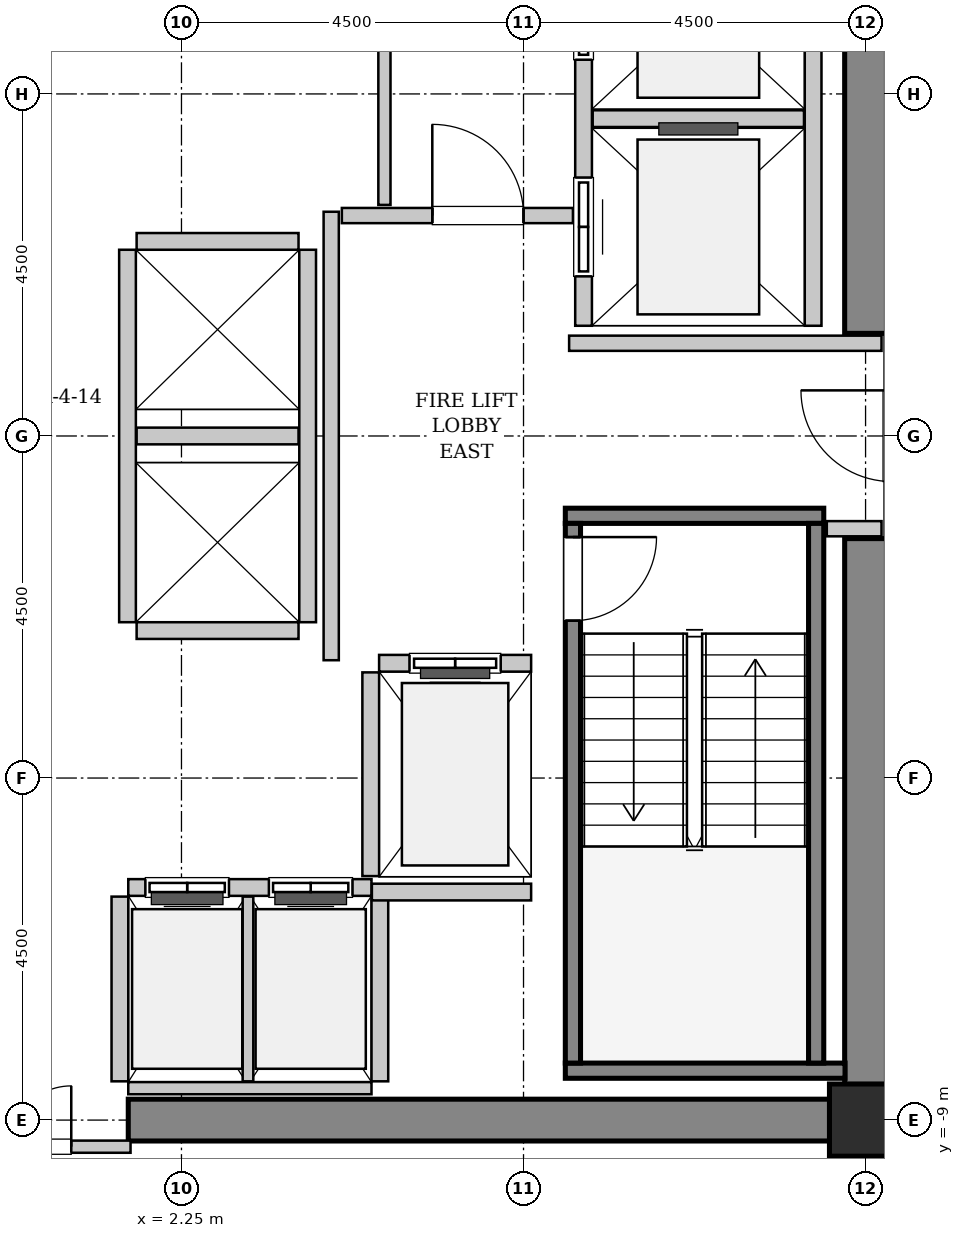
"""IFC4 building model, lengths in metres.
Left out: names, types, materials, properties, quantities, classifications, styles, units other than length and angle.
Written with IfcOpenShell. Run it as: python <this file> out.ifc"""

import sys

from ifc_helpers import new_model, si_unit, direction, frame, frame_2d, origin, origin_2d, place, context, subcontext, project, spatial, rectangle, hollow_rectangle, extrude, source, transform, mapped, element, fill, save


model = new_model("IFC4")
c1 = context("Model", 3, precision=1e-05, world=origin(), true_north=direction((0.0, 1.0)))
c2 = subcontext(c1, "Body", "Model", "MODEL_VIEW")
j1 = project(units=[si_unit("LENGTHUNIT", "METRE"), si_unit("PLANEANGLEUNIT", "RADIAN")], contexts=[c1])
p1 = place(None, origin())
s1 = spatial("IfcSite", under=j1, at=p1, CompositionType="ELEMENT")
p2 = place(p1, origin())
s2 = spatial("IfcBuilding", under=s1, at=p2, CompositionType="ELEMENT")
p3 = place(p2, frame((0.0, 0.0, 148.8)))
s3 = spatial("IfcBuildingStorey", under=s2, at=p3, CompositionType="ELEMENT", Elevation=148.8)
m1 = source(origin(), c2, "Body", "SweptSolid", [
    extrude(rectangle(XDim=9.975, YDim=0.55, at=frame_2d((4.987, 0.0))), origin(), (0.0, 0.0, 1.0), 3.8),
])
p4 = place(p3, frame((1.55, -9.0, 0.0), z_axis=(0.0, 0.0, 1.0), x_axis=(1.0, 0.0, 0.0)))
e1 = element("IfcWall", 1, at=p4, inside=s3, PredefinedType="SHEAR", context=c2, shape_type="MappedRepresentation", body=[
    mapped(m1, transform((0.0, 0.0, 0.0), x_axis=(1.0, 0.0, 0.0), y_axis=(0.0, 1.0, 0.0), z_axis=(0.0, 0.0, 1.0), scale=1.0)),
])
m2 = source(origin(), c2, "Body", "SweptSolid", [
    extrude(rectangle(XDim=7.375, YDim=0.55, at=frame_2d((3.688, 0.0))), origin(), (0.0, 0.0, 1.0), 3.8),
])
for number, where, z_axis, x_axis in (
    (2, (11.25, -8.725, 0.0), (0.0, 0.0, 1.0), (0.0, 1.0, 0.0)),
    (3, (11.25, 1.35, 0.0), (0.0, 0.0, 1.0), (0.0, 1.0, 0.0)),
):
    element("IfcWall", number, at=place(p3, frame(where, z_axis=z_axis, x_axis=x_axis)), inside=s3, PredefinedType="SHEAR", context=c2, shape_type="MappedRepresentation", body=[
        mapped(m2, transform((0.0, 0.0, 0.0), x_axis=(1.0, 0.0, 0.0), y_axis=(0.0, 1.0, 0.0), z_axis=(0.0, 0.0, 1.0), scale=1.0)),
    ])
m3 = source(origin(), c2, "Body", "SweptSolid", [
    extrude(hollow_rectangle(XDim=0.95, YDim=0.95, WallThickness=0.045, InnerFilletRadius=0.045, OuterFilletRadius=0.09, at=origin_2d()), origin(), (0.0, 0.0, 1.0), 3.8),
])
p5 = place(p3, frame((11.25, -9.0, 0.0), z_axis=(0.0, 0.0, 1.0), x_axis=(1.0, 0.0, 0.0)))
e4 = element("IfcColumn", 4, at=p5, inside=s3, PredefinedType="COLUMN", context=c2, shape_type="MappedRepresentation", body=[
    mapped(m3, transform((0.0, 0.0, 0.0), x_axis=(1.0, 0.0, 0.0), y_axis=(0.0, 1.0, 0.0), z_axis=(0.0, 0.0, 1.0), scale=1.0)),
])
m4 = source(origin(), c2, "Body", "SweptSolid", [
    extrude(rectangle(XDim=3.4, YDim=0.2, at=frame_2d((1.7, 0.0))), origin(), (0.0, 0.0, 1.0), 3.8),
])
p6 = place(p3, frame((7.3, -1.05, 0.0), z_axis=(0.0, 0.0, 1.0), x_axis=(1.0, 0.0, 0.0)))
e5 = element("IfcWall", 5, at=p6, inside=s3, PredefinedType="SOLIDWALL", context=c2, shape_type="MappedRepresentation", body=[
    mapped(m4, transform((0.0, 0.0, 0.0), x_axis=(1.0, 0.0, 0.0), y_axis=(0.0, 1.0, 0.0), z_axis=(0.0, 0.0, 1.0), scale=1.0)),
])
m5 = source(origin(), c2, "Body", "SweptSolid", [
    extrude(rectangle(XDim=3.68, YDim=0.2, at=frame_2d((1.84, 0.0))), origin(), (0.0, 0.0, 1.0), 3.8),
])
p7 = place(p3, frame((7.3, -8.35, 0.0), z_axis=(0.0, 0.0, 1.0), x_axis=(1.0, 0.0, 0.0)))
e6 = element("IfcWall", 6, at=p7, inside=s3, PredefinedType="SOLIDWALL", context=c2, shape_type="MappedRepresentation", body=[
    mapped(m5, transform((0.0, 0.0, 0.0), x_axis=(1.0, 0.0, 0.0), y_axis=(0.0, 1.0, 0.0), z_axis=(0.0, 0.0, 1.0), scale=1.0)),
])
m6 = source(origin(), c2, "Body", "SweptSolid", [
    extrude(rectangle(XDim=7.1, YDim=0.2, at=frame_2d((3.55, 0.0))), origin(), (0.0, 0.0, 1.0), 3.8),
])
p8 = place(p3, frame((7.4, -1.15, 0.0), z_axis=(0.0, 0.0, 1.0), x_axis=(0.0, -1.0, 0.0)))
e7 = element("IfcWall", 7, at=p8, inside=s3, PredefinedType="SOLIDWALL", context=c2, shape_type="MappedRepresentation", body=[
    mapped(m6, transform((0.0, 0.0, 0.0), x_axis=(1.0, 0.0, 0.0), y_axis=(0.0, 1.0, 0.0), z_axis=(0.0, 0.0, 1.0), scale=1.0)),
])
p9 = place(p8, frame((0.18, 0.0, 0.0)))
e8 = element("IfcOpeningElement", 8, at=p9, cuts=e7, PredefinedType="OPENING", context=c2, shape_type="SweptSolid", body=[
    extrude(rectangle(XDim=1.1, YDim=2.15, at=frame_2d((0.55, 1.075))), frame((0.0, 0.11, 0.0), z_axis=(0.0, -1.0, 0.0), x_axis=(1.0, 0.0, 0.0)), (0.0, 0.0, 1.0), 0.22),
])
p10 = place(p3, frame((10.6, -1.15, 0.0), z_axis=(0.0, 0.0, 1.0), x_axis=(0.0, -1.0, 0.0)))
e9 = element("IfcWall", 9, at=p10, inside=s3, PredefinedType="SOLIDWALL", context=c2, shape_type="MappedRepresentation", body=[
    mapped(m6, transform((0.0, 0.0, 0.0), x_axis=(1.0, 0.0, 0.0), y_axis=(0.0, 1.0, 0.0), z_axis=(0.0, 0.0, 1.0), scale=1.0)),
])
m7 = source(origin(), c2, "Body", "SweptSolid", [
    extrude(rectangle(XDim=2.0, YDim=0.22, at=frame_2d((1.0, 0.0))), origin(), (0.0, 0.0, 1.0), 3.535),
])
p11 = place(p3, frame((6.85, -2.99, 0.0), z_axis=(0.0, 0.0, 1.0), x_axis=(-1.0, 0.0, 0.0)))
e10 = element("IfcWall", 10, at=p11, inside=s3, PredefinedType="SOLIDWALL", context=c2, shape_type="MappedRepresentation", body=[
    mapped(m7, transform((0.0, 0.0, 0.0), x_axis=(1.0, 0.0, 0.0), y_axis=(0.0, 1.0, 0.0), z_axis=(0.0, 0.0, 1.0), scale=1.0)),
])
p12 = place(p11, frame((0.4, 0.0, 0.0)))
e11 = element("IfcOpeningElement", 11, at=p12, cuts=e10, PredefinedType="OPENING", context=c2, shape_type="SweptSolid", body=[
    extrude(rectangle(XDim=1.2, YDim=2.2, at=frame_2d((0.6, 1.1))), frame((0.0, 0.12, 0.0), z_axis=(0.0, -1.0, 0.0), x_axis=(1.0, 0.0, 0.0)), (0.0, 0.0, 1.0), 0.24),
])
m8 = source(origin(), c2, "Body", "SweptSolid", [
    extrude(rectangle(XDim=2.68, YDim=0.22, at=frame_2d((1.34, 0.0))), origin(), (0.0, 0.0, 1.0), 3.535),
])
p13 = place(p3, frame((4.74, -3.11, 0.0), z_axis=(0.0, 0.0, 1.0), x_axis=(0.0, -1.0, 0.0)))
e12 = element("IfcWall", 12, at=p13, inside=s3, PredefinedType="SOLIDWALL", context=c2, shape_type="MappedRepresentation", body=[
    mapped(m8, transform((0.0, 0.0, 0.0), x_axis=(1.0, 0.0, 0.0), y_axis=(0.0, 1.0, 0.0), z_axis=(0.0, 0.0, 1.0), scale=1.0)),
])
m9 = source(origin(), c2, "Body", "SweptSolid", [
    extrude(rectangle(XDim=5.45, YDim=0.22, at=frame_2d((2.725, 0.0))), origin(), (0.0, 0.0, 1.0), 3.535),
])
p14 = place(p3, frame((7.54, 6.9, 0.0), z_axis=(0.0, 0.0, 1.0), x_axis=(0.0, -1.0, 0.0)))
e13 = element("IfcWall", 13, at=p14, inside=s3, PredefinedType="SOLIDWALL", context=c2, shape_type="MappedRepresentation", body=[
    mapped(m9, transform((0.0, 0.0, 0.0), x_axis=(1.0, 0.0, 0.0), y_axis=(0.0, 1.0, 0.0), z_axis=(0.0, 0.0, 1.0), scale=1.0)),
])
p15 = place(p14, frame((3.5, 0.0, 0.0)))
e14 = element("IfcOpeningElement", 14, at=p15, cuts=e13, PredefinedType="OPENING", context=c2, shape_type="SweptSolid", body=[
    extrude(rectangle(XDim=1.3, YDim=2.3, at=frame_2d((0.65, 1.15))), frame((0.0, 0.12, 0.0), z_axis=(0.0, -1.0, 0.0), x_axis=(1.0, 0.0, 0.0)), (0.0, 0.0, 1.0), 0.24),
])
p16 = place(p14, frame((0.65, 0.0, 0.0)))
e15 = element("IfcOpeningElement", 15, at=p16, cuts=e13, PredefinedType="OPENING", context=c2, shape_type="SweptSolid", body=[
    extrude(rectangle(XDim=1.3, YDim=2.3, at=frame_2d((0.65, 1.15))), frame((0.0, 0.12, 0.0), z_axis=(0.0, -1.0, 0.0), x_axis=(1.0, 0.0, 0.0)), (0.0, 0.0, 1.0), 0.24),
])
p17 = place(p3, frame((10.56, 1.45, 0.0), z_axis=(0.0, 0.0, 1.0), x_axis=(0.0, 1.0, 0.0)))
e16 = element("IfcWall", 16, at=p17, inside=s3, PredefinedType="SOLIDWALL", context=c2, shape_type="MappedRepresentation", body=[
    mapped(m9, transform((0.0, 0.0, 0.0), x_axis=(1.0, 0.0, 0.0), y_axis=(0.0, 1.0, 0.0), z_axis=(0.0, 0.0, 1.0), scale=1.0)),
])
m10 = source(origin(), c2, "Body", "SweptSolid", [
    extrude(rectangle(XDim=2.78, YDim=0.22, at=frame_2d((1.39, 0.0))), origin(), (0.0, 0.0, 1.0), 3.535),
])
p18 = place(p3, frame((7.66, 4.175, 0.0), z_axis=(0.0, 0.0, 1.0), x_axis=(1.0, 0.0, 0.0)))
e17 = element("IfcWall", 17, at=p18, inside=s3, PredefinedType="SOLIDWALL", context=c2, shape_type="MappedRepresentation", body=[
    mapped(m10, transform((0.0, 0.0, 0.0), x_axis=(1.0, 0.0, 0.0), y_axis=(0.0, 1.0, 0.0), z_axis=(0.0, 0.0, 1.0), scale=1.0)),
])
m11 = source(origin(), c2, "Body", "SweptSolid", [
    extrude(rectangle(XDim=3.2, YDim=0.22, at=frame_2d((1.6, 0.0))), origin(), (0.0, 0.0, 1.0), 3.535),
])
p19 = place(p3, frame((4.75, -5.94, 0.0), z_axis=(0.0, 0.0, 1.0), x_axis=(-1.0, 0.0, 0.0)))
e18 = element("IfcWall", 18, at=p19, inside=s3, PredefinedType="SOLIDWALL", context=c2, shape_type="MappedRepresentation", body=[
    mapped(m11, transform((0.0, 0.0, 0.0), x_axis=(1.0, 0.0, 0.0), y_axis=(0.0, 1.0, 0.0), z_axis=(0.0, 0.0, 1.0), scale=1.0)),
])
p20 = place(p19, frame((1.875, 0.0, 0.0)))
e19 = element("IfcOpeningElement", 19, at=p20, cuts=e18, PredefinedType="OPENING", context=c2, shape_type="SweptSolid", body=[
    extrude(rectangle(XDim=1.1, YDim=2.2, at=frame_2d((0.55, 1.1))), frame((0.0, 0.12, 0.0), z_axis=(0.0, -1.0, 0.0), x_axis=(1.0, 0.0, 0.0)), (0.0, 0.0, 1.0), 0.24),
])
p21 = place(p19, frame((0.25, 0.0, 0.0)))
e20 = element("IfcOpeningElement", 20, at=p21, cuts=e18, PredefinedType="OPENING", context=c2, shape_type="SweptSolid", body=[
    extrude(rectangle(XDim=1.1, YDim=2.2, at=frame_2d((0.55, 1.1))), frame((0.0, 0.12, 0.0), z_axis=(0.0, -1.0, 0.0), x_axis=(1.0, 0.0, 0.0)), (0.0, 0.0, 1.0), 0.24),
])
m12 = source(origin(), c2, "Body", "SweptSolid", [
    extrude(rectangle(XDim=3.2, YDim=0.16, at=frame_2d((1.6, 0.0))), origin(), (0.0, 0.0, 1.0), 2.425),
])
p22 = place(p3, frame((1.55, -8.58, 0.0), z_axis=(0.0, 0.0, 1.0), x_axis=(1.0, 0.0, 0.0)))
e21 = element("IfcWall", 21, at=p22, inside=s3, PredefinedType="PARTITIONING", context=c2, shape_type="MappedRepresentation", body=[
    mapped(m12, transform((0.0, 0.0, 0.0), x_axis=(1.0, 0.0, 0.0), y_axis=(0.0, 1.0, 0.0), z_axis=(0.0, 0.0, 1.0), scale=1.0)),
])
m13 = source(origin(), c2, "Body", "SweptSolid", [
    extrude(rectangle(XDim=2.43, YDim=0.22, at=frame_2d((1.215, 0.0))), origin(), (0.0, 0.0, 1.0), 3.535),
])
p23 = place(p3, frame((1.44, -6.06, 0.0), z_axis=(0.0, 0.0, 1.0), x_axis=(0.0, -1.0, 0.0)))
e22 = element("IfcWall", 22, at=p23, inside=s3, PredefinedType="SOLIDWALL", context=c2, shape_type="MappedRepresentation", body=[
    mapped(m13, transform((0.0, 0.0, 0.0), x_axis=(1.0, 0.0, 0.0), y_axis=(0.0, 1.0, 0.0), z_axis=(0.0, 0.0, 1.0), scale=1.0)),
])
m14 = source(origin(), c2, "Body", "SweptSolid", [
    extrude(rectangle(XDim=2.43, YDim=0.14, at=frame_2d((1.215, 0.0))), origin(), (0.0, 0.0, 1.0), 3.535),
])
p24 = place(p3, frame((3.125, -8.49, 0.0), z_axis=(0.0, 0.0, 1.0), x_axis=(0.0, 1.0, 0.0)))
e23 = element("IfcWall", 23, at=p24, inside=s3, PredefinedType="PARTITIONING", context=c2, shape_type="MappedRepresentation", body=[
    mapped(m14, transform((0.0, 0.0, 0.0), x_axis=(1.0, 0.0, 0.0), y_axis=(0.0, 1.0, 0.0), z_axis=(0.0, 0.0, 1.0), scale=1.0)),
])
p25 = place(p3, frame((4.86, -8.49, 0.0), z_axis=(0.0, 0.0, 1.0), x_axis=(0.0, 1.0, 0.0)))
e24 = element("IfcWall", 24, at=p25, inside=s3, PredefinedType="SOLIDWALL", context=c2, shape_type="MappedRepresentation", body=[
    mapped(m13, transform((0.0, 0.0, 0.0), x_axis=(1.0, 0.0, 0.0), y_axis=(0.0, 1.0, 0.0), z_axis=(0.0, 0.0, 1.0), scale=1.0)),
])
m15 = source(origin(), c2, "Body", "SweptSolid", [
    extrude(rectangle(XDim=4.9, YDim=0.22, at=frame_2d((2.45, 0.0))), origin(), (0.0, 0.0, 1.0), 3.535),
])
for number, where, z_axis, x_axis in (
    (25, (1.54, 2.45, 0.0), (0.0, 0.0, 1.0), (0.0, -1.0, 0.0)),
    (26, (3.91, -2.45, 0.0), (0.0, 0.0, 1.0), (0.0, 1.0, 0.0)),
):
    element("IfcWall", number, at=place(p3, frame(where, z_axis=z_axis, x_axis=x_axis)), inside=s3, PredefinedType="SOLIDWALL", context=c2, shape_type="MappedRepresentation", body=[
        mapped(m15, transform((0.0, 0.0, 0.0), x_axis=(1.0, 0.0, 0.0), y_axis=(0.0, 1.0, 0.0), z_axis=(0.0, 0.0, 1.0), scale=1.0)),
    ])
m16 = source(origin(), c2, "Body", "SweptSolid", [
    extrude(rectangle(XDim=2.13, YDim=0.22, at=frame_2d((1.065, 0.0))), origin(), (0.0, 0.0, 1.0), 3.535),
])
for number, where, z_axis, x_axis in (
    (27, (1.66, -2.56, 0.0), (0.0, 0.0, 1.0), (1.0, 0.0, 0.0)),
    (28, (1.66, 0.0, 0.0), (0.0, 0.0, 1.0), (1.0, 0.0, 0.0)),
    (29, (3.79, 2.56, 0.0), (0.0, 0.0, 1.0), (-1.0, 0.0, 0.0)),
):
    element("IfcWall", number, at=place(p3, frame(where, z_axis=z_axis, x_axis=x_axis)), inside=s3, PredefinedType="SOLIDWALL", context=c2, shape_type="MappedRepresentation", body=[
        mapped(m16, transform((0.0, 0.0, 0.0), x_axis=(1.0, 0.0, 0.0), y_axis=(0.0, 1.0, 0.0), z_axis=(0.0, 0.0, 1.0), scale=1.0)),
    ])
m17 = source(origin(), c2, "Body", "SweptSolid", [
    extrude(rectangle(XDim=2.095, YDim=0.22, at=frame_2d((1.048, 0.0))), origin(), (0.0, 0.0, 1.0), 3.535),
])
p26 = place(p3, frame((4.755, -6.0, 0.0), z_axis=(0.0, 0.0, 1.0), x_axis=(1.0, 0.0, 0.0)))
e30 = element("IfcWall", 30, at=p26, inside=s3, PredefinedType="SOLIDWALL", context=c2, shape_type="MappedRepresentation", body=[
    mapped(m17, transform((0.0, 0.0, 0.0), x_axis=(1.0, 0.0, 0.0), y_axis=(0.0, 1.0, 0.0), z_axis=(0.0, 0.0, 1.0), scale=1.0)),
])
m18 = source(origin(), c2, "Body", "SweptSolid", [
    extrude(rectangle(XDim=5.9, YDim=0.2, at=frame_2d((2.95, 0.0))), origin(), (0.0, 0.0, 1.0), 3.535),
])
p27 = place(p3, frame((4.22, -2.95, 0.0), z_axis=(0.0, 0.0, 1.0), x_axis=(0.0, 1.0, 0.0)))
e31 = element("IfcWall", 31, at=p27, inside=s3, PredefinedType="PARTITIONING", context=c2, shape_type="MappedRepresentation", body=[
    mapped(m18, transform((0.0, 0.0, 0.0), x_axis=(1.0, 0.0, 0.0), y_axis=(0.0, 1.0, 0.0), z_axis=(0.0, 0.0, 1.0), scale=1.0)),
])
m19 = source(origin(), c2, "Body", "SweptSolid", [
    extrude(rectangle(XDim=3.04, YDim=0.2, at=frame_2d((1.52, 0.0))), origin(), (0.0, 0.0, 1.0), 3.535),
])
p28 = place(p3, frame((4.36, 2.9, 0.0), z_axis=(0.0, 0.0, 1.0), x_axis=(1.0, 0.0, 0.0)))
e32 = element("IfcWall", 32, at=p28, inside=s3, PredefinedType="PARTITIONING", context=c2, shape_type="MappedRepresentation", body=[
    mapped(m19, transform((0.0, 0.0, 0.0), x_axis=(1.0, 0.0, 0.0), y_axis=(0.0, 1.0, 0.0), z_axis=(0.0, 0.0, 1.0), scale=1.0)),
])
p29 = place(p28, frame((1.19, 0.0, 0.0)))
e33 = element("IfcOpeningElement", 33, at=p29, cuts=e32, PredefinedType="OPENING", context=c2, shape_type="SweptSolid", body=[
    extrude(rectangle(XDim=1.2, YDim=2.15, at=frame_2d((0.6, 1.075))), frame((0.0, 0.11, 0.0), z_axis=(0.0, -1.0, 0.0), x_axis=(1.0, 0.0, 0.0)), (0.0, 0.0, 1.0), 0.22),
])
m20 = source(origin(), c2, "Body", "SweptSolid", [
    extrude(rectangle(XDim=4.11, YDim=0.2, at=frame_2d((2.055, 0.0))), origin(), (0.0, 0.0, 1.0), 3.535),
])
p30 = place(p3, frame((7.35, 1.22, 0.0), z_axis=(0.0, 0.0, 1.0), x_axis=(1.0, 0.0, 0.0)))
e34 = element("IfcWall", 34, at=p30, inside=s3, PredefinedType="PARTITIONING", context=c2, shape_type="MappedRepresentation", body=[
    mapped(m20, transform((0.0, 0.0, 0.0), x_axis=(1.0, 0.0, 0.0), y_axis=(0.0, 1.0, 0.0), z_axis=(0.0, 0.0, 1.0), scale=1.0)),
])
m21 = source(origin(), c2, "Body", "SweptSolid", [
    extrude(rectangle(XDim=0.72, YDim=0.2, at=frame_2d((0.36, 0.0))), origin(), (0.0, 0.0, 1.0), 3.535),
])
p31 = place(p3, frame((10.74, -1.22, 0.0), z_axis=(0.0, 0.0, 1.0), x_axis=(1.0, 0.0, 0.0)))
e35 = element("IfcWall", 35, at=p31, inside=s3, PredefinedType="PARTITIONING", context=c2, shape_type="MappedRepresentation", body=[
    mapped(m21, transform((0.0, 0.0, 0.0), x_axis=(1.0, 0.0, 0.0), y_axis=(0.0, 1.0, 0.0), z_axis=(0.0, 0.0, 1.0), scale=1.0)),
])
m22 = source(origin(), c2, "Body", "SweptSolid", [
    extrude(rectangle(XDim=3.16, YDim=0.16, at=frame_2d((1.58, 0.0))), origin(), (0.0, 0.0, 1.0), 2.425),
])
p32 = place(p3, frame((-1.58, -9.35, 0.0), z_axis=(0.0, 0.0, 1.0), x_axis=(1.0, 0.0, 0.0)))
e36 = element("IfcWall", 36, at=p32, inside=s3, PredefinedType="PARTITIONING", context=c2, shape_type="MappedRepresentation", body=[
    mapped(m22, transform((0.0, 0.0, 0.0), x_axis=(1.0, 0.0, 0.0), y_axis=(0.0, 1.0, 0.0), z_axis=(0.0, 0.0, 1.0), scale=1.0)),
])
p33 = place(p32, frame((0.78, 0.0, 0.0)))
e37 = element("IfcOpeningElement", 37, at=p33, cuts=e36, PredefinedType="OPENING", context=c2, shape_type="SweptSolid", body=[
    extrude(rectangle(XDim=1.6, YDim=2.3, at=frame_2d((0.8, 1.15))), frame((0.0, 0.09, 0.0), z_axis=(0.0, -1.0, 0.0), x_axis=(1.0, 0.0, 0.0)), (0.0, 0.0, 1.0), 0.18),
])
m23 = source(origin(), c2, "Body", "SweptSolid", [
    extrude(rectangle(XDim=3.015, YDim=0.16, at=frame_2d((1.507, 0.0))), origin(), (0.0, 0.0, 1.0), 3.535),
])
p34 = place(p3, frame((4.92, 3.04, 0.0), z_axis=(0.0, 0.0, 1.0), x_axis=(0.0, 1.0, 0.0)))
e38 = element("IfcWall", 38, at=p34, inside=s3, PredefinedType="PARTITIONING", context=c2, shape_type="MappedRepresentation", body=[
    mapped(m23, transform((0.0, 0.0, 0.0), x_axis=(1.0, 0.0, 0.0), y_axis=(0.0, 1.0, 0.0), z_axis=(0.0, 0.0, 1.0), scale=1.0)),
])
m24 = source(origin(), c2, "Body", "SweptSolid", [
    extrude(rectangle(XDim=1.1, YDim=2.15, at=frame_2d((0.55, 1.075))), frame((0.0, 0.025, 0.0), z_axis=(0.0, -1.0, 0.0), x_axis=(1.0, 0.0, 0.0)), (0.0, 0.0, 1.0), 0.05),
])
p35 = place(p9, origin())
e39 = element("IfcDoor", 39, at=p35, inside=s3, OperationType="SINGLE_SWING_LEFT", PredefinedType="DOOR", context=c2, shape_type="MappedRepresentation", body=[
    mapped(m24, transform((0.0, 0.0, 0.0), x_axis=(1.0, 0.0, 0.0), y_axis=(0.0, 1.0, 0.0), z_axis=(0.0, 0.0, 1.0), scale=1.0)),
])
fill(e8, e39)
m25 = source(origin(), c2, "Body", "SweptSolid", [
    extrude(rectangle(XDim=1.2, YDim=2.2, at=frame_2d((0.6, 1.1))), frame((0.0, 0.025, 0.0), z_axis=(0.0, -1.0, 0.0), x_axis=(1.0, 0.0, 0.0)), (0.0, 0.0, 1.0), 0.05),
])
p36 = place(p12, origin())
e40 = element("IfcDoor", 40, at=p36, inside=s3, OperationType="SLIDING_TO_LEFT", PredefinedType="DOOR", context=c2, shape_type="MappedRepresentation", body=[
    mapped(m25, transform((0.0, 0.0, 0.0), x_axis=(1.0, 0.0, 0.0), y_axis=(0.0, 1.0, 0.0), z_axis=(0.0, 0.0, 1.0), scale=1.0)),
])
fill(e11, e40)
m26 = source(origin(), c2, "Body", "SweptSolid", [
    extrude(rectangle(XDim=1.3, YDim=2.3, at=frame_2d((0.65, 1.15))), frame((0.0, 0.025, 0.0), z_axis=(0.0, -1.0, 0.0), x_axis=(1.0, 0.0, 0.0)), (0.0, 0.0, 1.0), 0.05),
])
p37 = place(p15, origin())
e41 = element("IfcDoor", 41, at=p37, inside=s3, OperationType="SLIDING_TO_RIGHT", PredefinedType="DOOR", context=c2, shape_type="MappedRepresentation", body=[
    mapped(m26, transform((0.0, 0.0, 0.0), x_axis=(1.0, 0.0, 0.0), y_axis=(0.0, 1.0, 0.0), z_axis=(0.0, 0.0, 1.0), scale=1.0)),
])
fill(e14, e41)
p38 = place(p16, origin())
e42 = element("IfcDoor", 42, at=p38, inside=s3, OperationType="SLIDING_TO_RIGHT", PredefinedType="DOOR", context=c2, shape_type="MappedRepresentation", body=[
    mapped(m26, transform((0.0, 0.0, 0.0), x_axis=(1.0, 0.0, 0.0), y_axis=(0.0, 1.0, 0.0), z_axis=(0.0, 0.0, 1.0), scale=1.0)),
])
fill(e15, e42)
m27 = source(origin(), c2, "Body", "SweptSolid", [
    extrude(rectangle(XDim=1.1, YDim=2.2, at=frame_2d((0.55, 1.1))), frame((0.0, 0.025, 0.0), z_axis=(0.0, -1.0, 0.0), x_axis=(1.0, 0.0, 0.0)), (0.0, 0.0, 1.0), 0.05),
])
p39 = place(p20, origin())
e43 = element("IfcDoor", 43, at=p39, inside=s3, OperationType="DOUBLE_DOOR_SLIDING", PredefinedType="DOOR", context=c2, shape_type="MappedRepresentation", body=[
    mapped(m27, transform((0.0, 0.0, 0.0), x_axis=(1.0, 0.0, 0.0), y_axis=(0.0, 1.0, 0.0), z_axis=(0.0, 0.0, 1.0), scale=1.0)),
])
fill(e19, e43)
p40 = place(p21, origin())
e44 = element("IfcDoor", 44, at=p40, inside=s3, OperationType="DOUBLE_DOOR_SLIDING", PredefinedType="DOOR", context=c2, shape_type="MappedRepresentation", body=[
    mapped(m27, transform((0.0, 0.0, 0.0), x_axis=(1.0, 0.0, 0.0), y_axis=(0.0, 1.0, 0.0), z_axis=(0.0, 0.0, 1.0), scale=1.0)),
])
fill(e20, e44)
m28 = source(origin(), c2, "Body", "SweptSolid", [
    extrude(rectangle(XDim=1.2, YDim=2.15, at=frame_2d((0.6, 1.075))), frame((0.0, 0.025, 0.0), z_axis=(0.0, -1.0, 0.0), x_axis=(1.0, 0.0, 0.0)), (0.0, 0.0, 1.0), 0.05),
])
p41 = place(p29, origin())
e45 = element("IfcDoor", 45, at=p41, inside=s3, OperationType="SINGLE_SWING_LEFT", PredefinedType="DOOR", context=c2, shape_type="MappedRepresentation", body=[
    mapped(m28, transform((0.0, 0.0, 0.0), x_axis=(1.0, 0.0, 0.0), y_axis=(0.0, 1.0, 0.0), z_axis=(0.0, 0.0, 1.0), scale=1.0)),
])
fill(e33, e45)
m29 = source(origin(), c2, "Body", "SweptSolid", [
    extrude(rectangle(XDim=1.6, YDim=2.3, at=frame_2d((0.8, 1.15))), frame((0.0, 0.025, 0.0), z_axis=(0.0, -1.0, 0.0), x_axis=(1.0, 0.0, 0.0)), (0.0, 0.0, 1.0), 0.05),
])
p42 = place(p33, origin())
e46 = element("IfcDoor", 46, at=p42, inside=s3, OperationType="DOUBLE_DOOR_SINGLE_SWING", PredefinedType="DOOR", context=c2, shape_type="MappedRepresentation", body=[
    mapped(m29, transform((0.0, 0.0, 0.0), x_axis=(1.0, 0.0, 0.0), y_axis=(0.0, 1.0, 0.0), z_axis=(0.0, 0.0, 1.0), scale=1.0)),
])
fill(e37, e46)
save(model, sys.argv[1])
